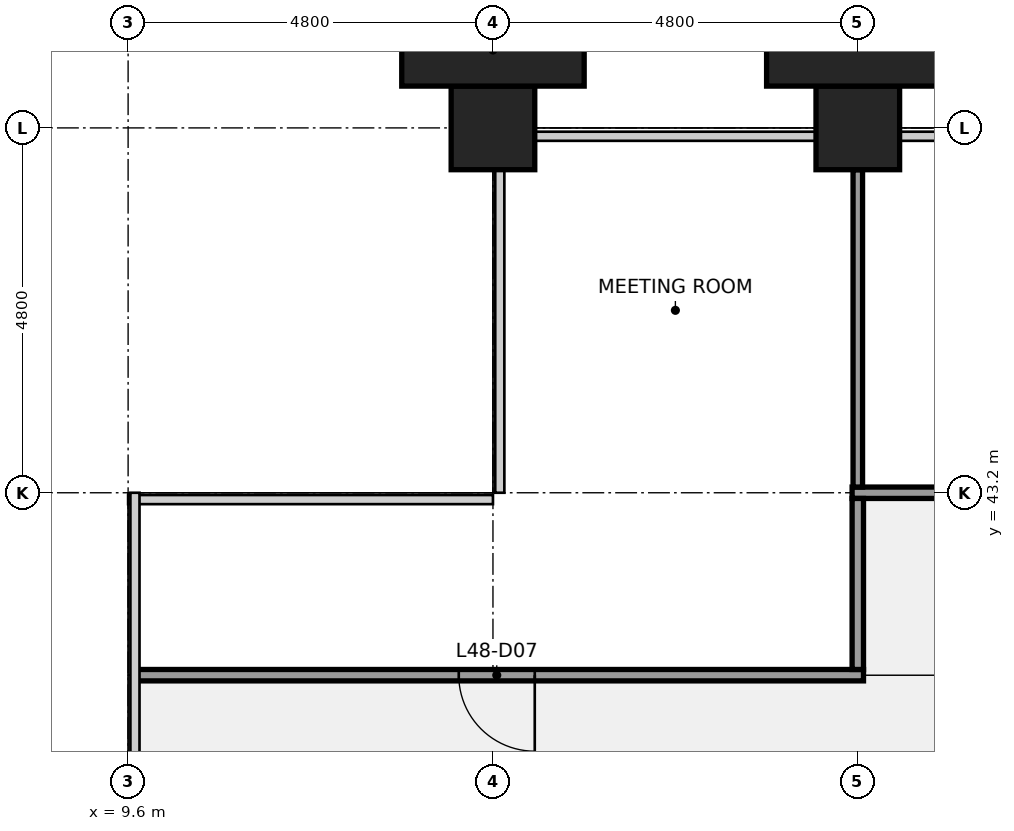
"""IFC4 building model, lengths in metres.
Left out: names, types, materials, properties, quantities, classifications, styles, units other than length and angle.
Written with IfcOpenShell. Run it as: python <this file> out.ifc"""

import sys

from ifc_helpers import new_model, si_unit, direction, frame, frame_2d, origin, origin_2d, place, context, subcontext, project, spatial, rectangle, extrude, element, fill, save


model = new_model("IFC4")
c1 = context("Model", 3, precision=1e-05, world=origin(), true_north=direction((0.0, 1.0)))
c2 = subcontext(c1, "Body", "Model", "MODEL_VIEW")
j1 = project(units=[si_unit("LENGTHUNIT", "METRE"), si_unit("PLANEANGLEUNIT", "RADIAN")], contexts=[c1])
p1 = place(None, origin())
s1 = spatial("IfcSite", under=j1, at=p1, CompositionType="ELEMENT")
p2 = place(p1, origin())
s2 = spatial("IfcBuilding", under=s1, at=p2, CompositionType="ELEMENT")
p3 = place(p2, frame((0.0, 0.0, 221.2)))
s3 = spatial("IfcBuildingStorey", under=s2, at=p3, CompositionType="ELEMENT", Elevation=221.2)
for number, where, z_axis, x_axis in (
    (1, (14.4, 48.0, 0.0), (0.0, 0.0, 1.0), (1.0, 0.0, 0.0)),
    (2, (19.2, 48.0, 0.0), (0.0, 0.0, 1.0), (1.0, 0.0, 0.0)),
):
    element("IfcColumn", number, at=place(p3, frame(where, z_axis=z_axis, x_axis=x_axis)), inside=s3, PredefinedType="COLUMN", context=c2, shape_type="SweptSolid", body=[
        extrude(rectangle(XDim=1.1, YDim=1.1, at=origin_2d()), origin(), (0.0, 0.0, 1.0), 4.0),
    ])
p4 = place(p3, frame((9.7, 40.8, 0.0), z_axis=(0.0, 0.0, 1.0), x_axis=(1.0, 0.0, 0.0)))
e3 = element("IfcWall", 3, at=p4, inside=s3, PredefinedType="PARTITIONING", context=c2, shape_type="SweptSolid", body=[
    extrude(rectangle(XDim=9.575, YDim=0.15, at=frame_2d((4.788, 0.0))), origin(), (0.0, 0.0, 1.0), 2.87),
])
p5 = place(p4, frame((4.25, 0.0, 0.0)))
e4 = element("IfcOpeningElement", 4, at=p5, cuts=e3, PredefinedType="OPENING", context=c2, shape_type="SweptSolid", body=[
    extrude(rectangle(XDim=1.0, YDim=2.1, at=frame_2d((0.5, 1.05))), frame((0.0, 0.085, 0.0), z_axis=(0.0, -1.0, 0.0), x_axis=(1.0, 0.0, 0.0)), (0.0, 0.0, 1.0), 0.17),
])
p6 = place(p3, frame((19.125, 43.2, 0.0), z_axis=(0.0, 0.0, 1.0), x_axis=(1.0, 0.0, 0.0)))
e5 = element("IfcWall", 5, at=p6, inside=s3, PredefinedType="PARTITIONING", context=c2, shape_type="SweptSolid", body=[
    extrude(rectangle(XDim=19.35, YDim=0.15, at=frame_2d((9.675, 0.0))), origin(), (0.0, 0.0, 1.0), 2.87),
])
p7 = place(p6, frame((4.375, 0.0, 0.0)))
e6 = element("IfcOpeningElement", 6, at=p7, cuts=e5, PredefinedType="OPENING", context=c2, shape_type="SweptSolid", body=[
    extrude(rectangle(XDim=1.0, YDim=2.1, at=frame_2d((0.5, 1.05))), frame((0.0, 0.085, 0.0), z_axis=(0.0, -1.0, 0.0), x_axis=(1.0, 0.0, 0.0)), (0.0, 0.0, 1.0), 0.17),
])
p8 = place(p6, frame((10.375, 0.0, 0.0)))
e7 = element("IfcOpeningElement", 7, at=p8, cuts=e5, PredefinedType="OPENING", context=c2, shape_type="SweptSolid", body=[
    extrude(rectangle(XDim=1.0, YDim=2.1, at=frame_2d((0.5, 1.05))), frame((0.0, 0.085, 0.0), z_axis=(0.0, -1.0, 0.0), x_axis=(1.0, 0.0, 0.0)), (0.0, 0.0, 1.0), 0.17),
])
p9 = place(p6, frame((13.975, 0.0, 0.0)))
e8 = element("IfcOpeningElement", 8, at=p9, cuts=e5, PredefinedType="OPENING", context=c2, shape_type="SweptSolid", body=[
    extrude(rectangle(XDim=1.0, YDim=2.1, at=frame_2d((0.5, 1.05))), frame((0.0, 0.085, 0.0), z_axis=(0.0, -1.0, 0.0), x_axis=(1.0, 0.0, 0.0)), (0.0, 0.0, 1.0), 0.17),
])
p10 = place(p6, frame((17.575, 0.0, 0.0)))
e9 = element("IfcOpeningElement", 9, at=p10, cuts=e5, PredefinedType="OPENING", context=c2, shape_type="SweptSolid", body=[
    extrude(rectangle(XDim=1.0, YDim=2.1, at=frame_2d((0.5, 1.05))), frame((0.0, 0.085, 0.0), z_axis=(0.0, -1.0, 0.0), x_axis=(1.0, 0.0, 0.0)), (0.0, 0.0, 1.0), 0.17),
])
p11 = place(p3, frame((19.2, 43.275, 0.0), z_axis=(0.0, 0.0, 1.0), x_axis=(0.0, 1.0, 0.0)))
e10 = element("IfcWall", 10, at=p11, inside=s3, PredefinedType="PARTITIONING", context=c2, shape_type="SweptSolid", body=[
    extrude(rectangle(XDim=4.175, YDim=0.125, at=frame_2d((2.087, 0.0))), origin(), (0.0, 0.0, 1.0), 2.87),
])
p12 = place(p3, frame((19.2, 40.875, 0.0), z_axis=(0.0, 0.0, 1.0), x_axis=(0.0, 1.0, 0.0)))
e11 = element("IfcWall", 11, at=p12, inside=s3, PredefinedType="PARTITIONING", context=c2, shape_type="SweptSolid", body=[
    extrude(rectangle(XDim=2.25, YDim=0.15, at=frame_2d((1.125, 0.0))), origin(), (0.0, 0.0, 1.0), 2.87),
])
for number, where, z_axis, x_axis in (
    (12, (14.4, 49.025, 0.0), (0.0, 0.0, 1.0), (1.0, 0.0, 0.0)),
    (13, (19.2, 49.025, 0.0), (0.0, 0.0, 1.0), (1.0, 0.0, 0.0)),
):
    element("IfcColumn", number, at=place(p3, frame(where, z_axis=z_axis, x_axis=x_axis)), inside=s3, PredefinedType="PILASTER", context=c2, shape_type="SweptSolid", body=[
        extrude(rectangle(XDim=2.4, YDim=0.95, at=origin_2d()), origin(), (0.0, 0.0, 1.0), 4.0),
    ])
p13 = place(p5, origin())
e14 = element("IfcDoor", 14, at=p13, inside=s3, OperationType="SINGLE_SWING_RIGHT", PredefinedType="DOOR", context=c2, shape_type="SweptSolid", body=[
    extrude(rectangle(XDim=1.0, YDim=2.1, at=frame_2d((0.5, 1.05))), frame((0.0, 0.025, 0.0), z_axis=(0.0, -1.0, 0.0), x_axis=(1.0, 0.0, 0.0)), (0.0, 0.0, 1.0), 0.05),
])
fill(e4, e14)
save(model, sys.argv[1])
